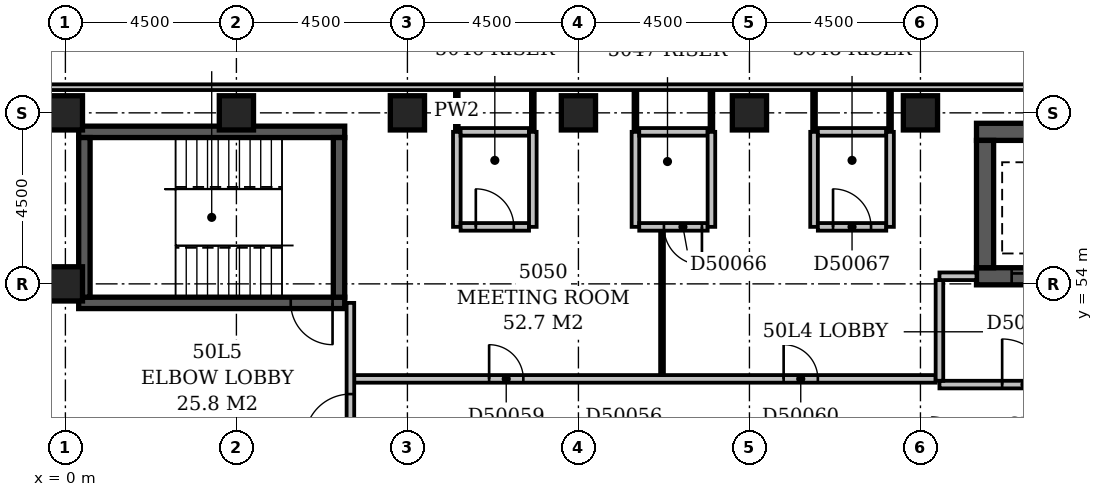
"""IFC4 building model, lengths in metres.
Left out: names, types, materials, properties, quantities, classifications, styles, units other than length and angle.
Written with IfcOpenShell. Run it as: python <this file> out.ifc"""

import sys

from ifc_helpers import new_model, si_unit, direction, frame, frame_2d, origin, origin_2d, place, context, subcontext, project, spatial, rectangle, extrude, element, fill, save


model = new_model("IFC4")
c1 = context("Model", 3, precision=1e-05, world=origin(), true_north=direction((0.0, 1.0)))
c2 = subcontext(c1, "Body", "Model", "MODEL_VIEW")
j1 = project(units=[si_unit("LENGTHUNIT", "METRE"), si_unit("PLANEANGLEUNIT", "RADIAN")], contexts=[c1])
p1 = place(None, origin())
s1 = spatial("IfcSite", under=j1, at=p1, CompositionType="ELEMENT")
p2 = place(p1, origin())
s2 = spatial("IfcBuilding", under=s1, at=p2, CompositionType="ELEMENT")
p3 = place(p2, frame((0.0, 0.0, 197.0)))
s3 = spatial("IfcBuildingStorey", under=s2, at=p3, CompositionType="ELEMENT", Elevation=197.0)
p4 = place(p3, frame((0.35, 53.5, -0.3), z_axis=(0.0, 0.0, 1.0), x_axis=(1.0, 0.0, 0.0)))
e1 = element("IfcWall", 1, at=p4, inside=s3, PredefinedType="SHEAR", context=c2, shape_type="SweptSolid", body=[
    extrude(rectangle(XDim=7.0, YDim=0.3, at=frame_2d((3.5, 0.0))), origin(), (0.0, 0.0, 1.0), 3.6),
])
p5 = place(p4, frame((5.58, 0.0, 0.3)))
e2 = element("IfcOpeningElement", 2, at=p5, cuts=e1, PredefinedType="OPENING", context=c2, shape_type="SweptSolid", body=[
    extrude(rectangle(XDim=1.1, YDim=2.1, at=frame_2d((0.55, 1.05))), frame((0.0, 0.162, 0.0), z_axis=(0.0, -1.0, 0.0), x_axis=(1.0, 0.0, 0.0)), (0.0, 0.0, 1.0), 0.324),
])
p6 = place(p3, frame((0.35, 58.0, -0.3), z_axis=(0.0, 0.0, 1.0), x_axis=(1.0, 0.0, 0.0)))
e3 = element("IfcWall", 3, at=p6, inside=s3, PredefinedType="SHEAR", context=c2, shape_type="SweptSolid", body=[
    extrude(rectangle(XDim=7.0, YDim=0.3, at=frame_2d((3.5, 0.0))), origin(), (0.0, 0.0, 1.0), 3.6),
])
for number, where, z_axis, x_axis in (
    (4, (0.5, 53.65, -0.3), (0.0, 0.0, 1.0), (0.0, 1.0, 0.0)),
    (5, (7.2, 53.65, -0.3), (0.0, 0.0, 1.0), (0.0, 1.0, 0.0)),
):
    element("IfcWall", number, at=place(p3, frame(where, z_axis=z_axis, x_axis=x_axis)), inside=s3, PredefinedType="SHEAR", context=c2, shape_type="SweptSolid", body=[
        extrude(rectangle(XDim=4.2, YDim=0.3, at=frame_2d((2.1, 0.0))), origin(), (0.0, 0.0, 1.0), 3.6),
    ])
p7 = place(p3, frame((23.975, 54.2, -0.3), z_axis=(0.0, 0.0, 1.0), x_axis=(1.0, 0.0, 0.0)))
e6 = element("IfcWall", 6, at=p7, inside=s3, PredefinedType="SHEAR", context=c2, shape_type="SweptSolid", body=[
    extrude(rectangle(XDim=2.95, YDim=0.45, at=frame_2d((1.475, 0.0))), origin(), (0.0, 0.0, 1.0), 3.6),
])
p8 = place(p7, frame((0.925, 0.0, 0.3)))
e7 = element("IfcOpeningElement", 7, at=p8, cuts=e6, PredefinedType="OPENING", context=c2, shape_type="SweptSolid", body=[
    extrude(rectangle(XDim=1.1, YDim=2.1, at=frame_2d((0.55, 1.05))), frame((0.0, 0.237, 0.0), z_axis=(0.0, -1.0, 0.0), x_axis=(1.0, 0.0, 0.0)), (0.0, 0.0, 1.0), 0.474),
])
p9 = place(p3, frame((23.975, 58.0, -0.3), z_axis=(0.0, 0.0, 1.0), x_axis=(1.0, 0.0, 0.0)))
e8 = element("IfcWall", 8, at=p9, inside=s3, PredefinedType="SHEAR", context=c2, shape_type="SweptSolid", body=[
    extrude(rectangle(XDim=2.95, YDim=0.45, at=frame_2d((1.475, 0.0))), origin(), (0.0, 0.0, 1.0), 3.6),
])
p10 = place(p3, frame((24.2, 54.425, -0.3), z_axis=(0.0, 0.0, 1.0), x_axis=(0.0, 1.0, 0.0)))
e9 = element("IfcWall", 9, at=p10, inside=s3, PredefinedType="SHEAR", context=c2, shape_type="SweptSolid", body=[
    extrude(rectangle(XDim=3.35, YDim=0.45, at=frame_2d((1.675, 0.0))), origin(), (0.0, 0.0, 1.0), 3.6),
])
for number, where, z_axis, x_axis in (
    (10, (0.0, 54.0, -0.3), (0.0, 0.0, 1.0), (1.0, 0.0, 0.0)),
    (11, (0.0, 58.5, -0.3), (0.0, 0.0, 1.0), (1.0, 0.0, 0.0)),
    (12, (4.5, 58.5, -0.3), (0.0, 0.0, 1.0), (1.0, 0.0, 0.0)),
    (13, (9.0, 58.5, -0.3), (0.0, 0.0, 1.0), (1.0, 0.0, 0.0)),
    (14, (13.5, 58.5, -0.3), (0.0, 0.0, 1.0), (1.0, 0.0, 0.0)),
    (15, (18.0, 58.5, -0.3), (0.0, 0.0, 1.0), (1.0, 0.0, 0.0)),
    (16, (22.5, 58.5, -0.3), (0.0, 0.0, 1.0), (1.0, 0.0, 0.0)),
):
    element("IfcColumn", number, at=place(p3, frame(where, z_axis=z_axis, x_axis=x_axis)), inside=s3, PredefinedType="COLUMN", context=c2, shape_type="SweptSolid", body=[
        extrude(rectangle(XDim=0.9, YDim=0.9, at=origin_2d()), origin(), (0.0, 0.0, 1.0), 3.6),
    ])
p11 = place(p3, frame((50.1, 59.175, 0.0), z_axis=(0.0, 0.0, 1.0), x_axis=(-1.0, 0.0, 0.0)))
e17 = element("IfcWall", 17, at=p11, inside=s3, PredefinedType="STANDARD", context=c2, shape_type="SweptSolid", body=[
    extrude(rectangle(XDim=50.85, YDim=0.15, at=frame_2d((25.425, 0.0))), origin(), (0.0, 0.0, 1.0), 2.7),
])
p12 = place(p3, frame((23.0, 51.35, 0.0), z_axis=(0.0, 0.0, 1.0), x_axis=(1.0, 0.0, 0.0)))
e18 = element("IfcWall", 18, at=p12, inside=s3, PredefinedType="PARTITIONING", context=c2, shape_type="SweptSolid", body=[
    extrude(rectangle(XDim=4.8, YDim=0.2, at=frame_2d((2.4, 0.0))), origin(), (0.0, 0.0, 1.0), 3.3),
])
p13 = place(p12, frame((1.65, 0.0, 0.0)))
e19 = element("IfcOpeningElement", 19, at=p13, cuts=e18, PredefinedType="OPENING", context=c2, shape_type="SweptSolid", body=[
    extrude(rectangle(XDim=1.2, YDim=2.1, at=frame_2d((0.6, 1.05))), frame((0.0, 0.112, 0.0), z_axis=(0.0, -1.0, 0.0), x_axis=(1.0, 0.0, 0.0)), (0.0, 0.0, 1.0), 0.224),
])
p14 = place(p3, frame((23.0, 54.2, 0.0), z_axis=(0.0, 0.0, 1.0), x_axis=(1.0, 0.0, 0.0)))
e20 = element("IfcWall", 20, at=p14, inside=s3, PredefinedType="PARTITIONING", context=c2, shape_type="SweptSolid", body=[
    extrude(rectangle(XDim=0.975, YDim=0.2, at=frame_2d((0.488, 0.0))), origin(), (0.0, 0.0, 1.0), 3.3),
])
p15 = place(p3, frame((23.0, 51.45, 0.0), z_axis=(0.0, 0.0, 1.0), x_axis=(0.0, 1.0, 0.0)))
e21 = element("IfcWall", 21, at=p15, inside=s3, PredefinedType="PARTITIONING", context=c2, shape_type="SweptSolid", body=[
    extrude(rectangle(XDim=2.65, YDim=0.2, at=frame_2d((1.325, 0.0))), origin(), (0.0, 0.0, 1.0), 3.3),
])
p16 = place(p3, frame((7.5, 49.6, 0.0), z_axis=(0.0, 0.0, 1.0), x_axis=(0.0, 1.0, 0.0)))
e22 = element("IfcWall", 22, at=p16, inside=s3, PredefinedType="PARTITIONING", context=c2, shape_type="SweptSolid", body=[
    extrude(rectangle(XDim=3.9, YDim=0.2, at=frame_2d((1.95, 0.0))), origin(), (0.0, 0.0, 1.0), 3.3),
])
p17 = place(p16, frame((0.3, 0.0, 0.0)))
e23 = element("IfcOpeningElement", 23, at=p17, cuts=e22, PredefinedType="OPENING", context=c2, shape_type="SweptSolid", body=[
    extrude(rectangle(XDim=1.2, YDim=2.1, at=frame_2d((0.6, 1.05))), frame((0.0, 0.112, 0.0), z_axis=(0.0, -1.0, 0.0), x_axis=(1.0, 0.0, 0.0)), (0.0, 0.0, 1.0), 0.224),
])
p18 = place(p3, frame((7.6, 51.5, 0.0), z_axis=(0.0, 0.0, 1.0), x_axis=(1.0, 0.0, 0.0)))
e24 = element("IfcWall", 24, at=p18, inside=s3, PredefinedType="PARTITIONING", context=c2, shape_type="SweptSolid", body=[
    extrude(rectangle(XDim=15.3, YDim=0.2, at=frame_2d((7.65, 0.0))), origin(), (0.0, 0.0, 1.0), 3.3),
])
p19 = place(p18, frame((3.55, 0.0, 0.0)))
e25 = element("IfcOpeningElement", 25, at=p19, cuts=e24, PredefinedType="OPENING", context=c2, shape_type="SweptSolid", body=[
    extrude(rectangle(XDim=0.9, YDim=2.1, at=frame_2d((0.45, 1.05))), frame((0.0, 0.112, 0.0), z_axis=(0.0, -1.0, 0.0), x_axis=(1.0, 0.0, 0.0)), (0.0, 0.0, 1.0), 0.224),
])
p20 = place(p18, frame((11.3, 0.0, 0.0)))
e26 = element("IfcOpeningElement", 26, at=p20, cuts=e24, PredefinedType="OPENING", context=c2, shape_type="SweptSolid", body=[
    extrude(rectangle(XDim=0.9, YDim=2.1, at=frame_2d((0.45, 1.05))), frame((0.0, 0.112, 0.0), z_axis=(0.0, -1.0, 0.0), x_axis=(1.0, 0.0, 0.0)), (0.0, 0.0, 1.0), 0.224),
])
p21 = place(p3, frame((15.7, 51.6, 0.0), z_axis=(0.0, 0.0, 1.0), x_axis=(0.0, 1.0, 0.0)))
e27 = element("IfcWall", 27, at=p21, inside=s3, PredefinedType="PARTITIONING", context=c2, shape_type="SweptSolid", body=[
    extrude(rectangle(XDim=3.8, YDim=0.1, at=frame_2d((1.9, 0.0))), origin(), (0.0, 0.0, 1.0), 3.3),
])
p22 = place(p3, frame((10.3, 55.5, 0.0), z_axis=(0.0, 0.0, 1.0), x_axis=(0.0, 1.0, 0.0)))
e28 = element("IfcWall", 28, at=p22, inside=s3, PredefinedType="PARTITIONING", context=c2, shape_type="SweptSolid", body=[
    extrude(rectangle(XDim=2.5, YDim=0.2, at=frame_2d((1.25, 0.0))), origin(), (0.0, 0.0, 1.0), 3.3),
])
p23 = place(p3, frame((10.4, 55.5, 0.0), z_axis=(0.0, 0.0, 1.0), x_axis=(1.0, 0.0, 0.0)))
e29 = element("IfcWall", 29, at=p23, inside=s3, PredefinedType="PARTITIONING", context=c2, shape_type="SweptSolid", body=[
    extrude(rectangle(XDim=1.8, YDim=0.2, at=frame_2d((0.9, 0.0))), origin(), (0.0, 0.0, 1.0), 3.3),
])
p24 = place(p23, frame((0.4, 0.0, 0.0)))
e30 = element("IfcOpeningElement", 30, at=p24, cuts=e29, PredefinedType="OPENING", context=c2, shape_type="SweptSolid", body=[
    extrude(rectangle(XDim=1.0, YDim=2.1, at=frame_2d((0.5, 1.05))), frame((0.0, 0.112, 0.0), z_axis=(0.0, -1.0, 0.0), x_axis=(1.0, 0.0, 0.0)), (0.0, 0.0, 1.0), 0.224),
])
for number, where, z_axis, x_axis in (
    (31, (12.3, 55.5, 0.0), (0.0, 0.0, 1.0), (0.0, 1.0, 0.0)),
    (32, (15.0, 55.5, 0.0), (0.0, 0.0, 1.0), (0.0, 1.0, 0.0)),
):
    element("IfcWall", number, at=place(p3, frame(where, z_axis=z_axis, x_axis=x_axis)), inside=s3, PredefinedType="PARTITIONING", context=c2, shape_type="SweptSolid", body=[
        extrude(rectangle(XDim=2.5, YDim=0.2, at=frame_2d((1.25, 0.0))), origin(), (0.0, 0.0, 1.0), 3.3),
    ])
p25 = place(p3, frame((15.1, 55.5, 0.0), z_axis=(0.0, 0.0, 1.0), x_axis=(1.0, 0.0, 0.0)))
e33 = element("IfcWall", 33, at=p25, inside=s3, PredefinedType="PARTITIONING", context=c2, shape_type="SweptSolid", body=[
    extrude(rectangle(XDim=1.8, YDim=0.2, at=frame_2d((0.9, 0.0))), origin(), (0.0, 0.0, 1.0), 3.3),
])
p26 = place(p25, frame((0.65, 0.0, 0.0)))
e34 = element("IfcOpeningElement", 34, at=p26, cuts=e33, PredefinedType="OPENING", context=c2, shape_type="SweptSolid", body=[
    extrude(rectangle(XDim=1.0, YDim=2.1, at=frame_2d((0.5, 1.05))), frame((0.0, 0.112, 0.0), z_axis=(0.0, -1.0, 0.0), x_axis=(1.0, 0.0, 0.0)), (0.0, 0.0, 1.0), 0.224),
])
for number, where, z_axis, x_axis in (
    (35, (17.0, 55.5, 0.0), (0.0, 0.0, 1.0), (0.0, 1.0, 0.0)),
    (36, (19.7, 55.5, 0.0), (0.0, 0.0, 1.0), (0.0, 1.0, 0.0)),
):
    element("IfcWall", number, at=place(p3, frame(where, z_axis=z_axis, x_axis=x_axis)), inside=s3, PredefinedType="PARTITIONING", context=c2, shape_type="SweptSolid", body=[
        extrude(rectangle(XDim=2.5, YDim=0.2, at=frame_2d((1.25, 0.0))), origin(), (0.0, 0.0, 1.0), 3.3),
    ])
p27 = place(p3, frame((19.8, 55.5, 0.0), z_axis=(0.0, 0.0, 1.0), x_axis=(1.0, 0.0, 0.0)))
e37 = element("IfcWall", 37, at=p27, inside=s3, PredefinedType="PARTITIONING", context=c2, shape_type="SweptSolid", body=[
    extrude(rectangle(XDim=1.8, YDim=0.2, at=frame_2d((0.9, 0.0))), origin(), (0.0, 0.0, 1.0), 3.3),
])
p28 = place(p27, frame((0.4, 0.0, 0.0)))
e38 = element("IfcOpeningElement", 38, at=p28, cuts=e37, PredefinedType="OPENING", context=c2, shape_type="SweptSolid", body=[
    extrude(rectangle(XDim=1.0, YDim=2.1, at=frame_2d((0.5, 1.05))), frame((0.0, 0.112, 0.0), z_axis=(0.0, -1.0, 0.0), x_axis=(1.0, 0.0, 0.0)), (0.0, 0.0, 1.0), 0.224),
])
p29 = place(p3, frame((21.7, 55.5, 0.0), z_axis=(0.0, 0.0, 1.0), x_axis=(0.0, 1.0, 0.0)))
e39 = element("IfcWall", 39, at=p29, inside=s3, PredefinedType="PARTITIONING", context=c2, shape_type="SweptSolid", body=[
    extrude(rectangle(XDim=2.5, YDim=0.2, at=frame_2d((1.25, 0.0))), origin(), (0.0, 0.0, 1.0), 3.3),
])
p30 = place(p3, frame((10.3, 58.0, 0.0), z_axis=(0.0, 0.0, 1.0), x_axis=(0.0, 1.0, 0.0)))
e40 = element("IfcWall", 40, at=p30, inside=s3, PredefinedType="PARTITIONING", context=c2, shape_type="SweptSolid", body=[
    extrude(rectangle(XDim=1.1, YDim=0.1, at=frame_2d((0.55, 0.0))), origin(), (0.0, 0.0, 1.0), 3.3),
])
p31 = place(p3, frame((10.4, 58.0, 0.0), z_axis=(0.0, 0.0, 1.0), x_axis=(1.0, 0.0, 0.0)))
e41 = element("IfcWall", 41, at=p31, inside=s3, PredefinedType="PARTITIONING", context=c2, shape_type="SweptSolid", body=[
    extrude(rectangle(XDim=1.8, YDim=0.2, at=frame_2d((0.9, 0.0))), origin(), (0.0, 0.0, 1.0), 3.3),
])
for number, where, z_axis, x_axis in (
    (42, (12.3, 58.0, 0.0), (0.0, 0.0, 1.0), (0.0, 1.0, 0.0)),
    (43, (15.0, 58.0, 0.0), (0.0, 0.0, 1.0), (0.0, 1.0, 0.0)),
):
    element("IfcWall", number, at=place(p3, frame(where, z_axis=z_axis, x_axis=x_axis)), inside=s3, PredefinedType="PARTITIONING", context=c2, shape_type="SweptSolid", body=[
        extrude(rectangle(XDim=1.1, YDim=0.1, at=frame_2d((0.55, 0.0))), origin(), (0.0, 0.0, 1.0), 3.3),
    ])
p32 = place(p3, frame((15.1, 58.0, 0.0), z_axis=(0.0, 0.0, 1.0), x_axis=(1.0, 0.0, 0.0)))
e44 = element("IfcWall", 44, at=p32, inside=s3, PredefinedType="PARTITIONING", context=c2, shape_type="SweptSolid", body=[
    extrude(rectangle(XDim=1.8, YDim=0.2, at=frame_2d((0.9, 0.0))), origin(), (0.0, 0.0, 1.0), 3.3),
])
for number, where, z_axis, x_axis in (
    (45, (17.0, 58.0, 0.0), (0.0, 0.0, 1.0), (0.0, 1.0, 0.0)),
    (46, (19.7, 58.0, 0.0), (0.0, 0.0, 1.0), (0.0, 1.0, 0.0)),
):
    element("IfcWall", number, at=place(p3, frame(where, z_axis=z_axis, x_axis=x_axis)), inside=s3, PredefinedType="PARTITIONING", context=c2, shape_type="SweptSolid", body=[
        extrude(rectangle(XDim=1.1, YDim=0.1, at=frame_2d((0.55, 0.0))), origin(), (0.0, 0.0, 1.0), 3.3),
    ])
p33 = place(p3, frame((19.8, 58.0, 0.0), z_axis=(0.0, 0.0, 1.0), x_axis=(1.0, 0.0, 0.0)))
e47 = element("IfcWall", 47, at=p33, inside=s3, PredefinedType="PARTITIONING", context=c2, shape_type="SweptSolid", body=[
    extrude(rectangle(XDim=1.8, YDim=0.2, at=frame_2d((0.9, 0.0))), origin(), (0.0, 0.0, 1.0), 3.3),
])
p34 = place(p3, frame((21.7, 58.0, 0.0), z_axis=(0.0, 0.0, 1.0), x_axis=(0.0, 1.0, 0.0)))
e48 = element("IfcWall", 48, at=p34, inside=s3, PredefinedType="PARTITIONING", context=c2, shape_type="SweptSolid", body=[
    extrude(rectangle(XDim=1.1, YDim=0.1, at=frame_2d((0.55, 0.0))), origin(), (0.0, 0.0, 1.0), 3.3),
])
p35 = place(p17, origin())
e49 = element("IfcDoor", 49, at=p35, inside=s3, OperationType="SINGLE_SWING_LEFT", PredefinedType="DOOR", context=c2, shape_type="SweptSolid", body=[
    extrude(rectangle(XDim=1.2, YDim=2.1, at=frame_2d((0.6, 1.05))), frame((0.0, 0.025, 0.0), z_axis=(0.0, -1.0, 0.0), x_axis=(1.0, 0.0, 0.0)), (0.0, 0.0, 1.0), 0.05),
])
fill(e23, e49)
p36 = place(p13, origin())
e50 = element("IfcDoor", 50, at=p36, inside=s3, OperationType="SINGLE_SWING_LEFT", PredefinedType="DOOR", context=c2, shape_type="SweptSolid", body=[
    extrude(rectangle(XDim=1.2, YDim=2.1, at=frame_2d((0.6, 1.05))), frame((0.0, 0.025, 0.0), z_axis=(0.0, -1.0, 0.0), x_axis=(1.0, 0.0, 0.0)), (0.0, 0.0, 1.0), 0.05),
])
fill(e19, e50)
p37 = place(p8, origin())
e51 = element("IfcDoor", 51, at=p37, inside=s3, OperationType="SLIDING_TO_LEFT", PredefinedType="DOOR", context=c2, shape_type="SweptSolid", body=[
    extrude(rectangle(XDim=1.1, YDim=2.1, at=frame_2d((0.55, 1.05))), frame((0.0, 0.025, 0.0), z_axis=(0.0, -1.0, 0.0), x_axis=(1.0, 0.0, 0.0)), (0.0, 0.0, 1.0), 0.05),
])
fill(e7, e51)
p38 = place(p5, origin())
e52 = element("IfcDoor", 52, at=p38, inside=s3, OperationType="SINGLE_SWING_RIGHT", PredefinedType="DOOR", context=c2, shape_type="SweptSolid", body=[
    extrude(rectangle(XDim=1.1, YDim=2.1, at=frame_2d((0.55, 1.05))), frame((0.0, 0.025, 0.0), z_axis=(0.0, -1.0, 0.0), x_axis=(1.0, 0.0, 0.0)), (0.0, 0.0, 1.0), 0.05),
])
fill(e2, e52)
p39 = place(p19, origin())
e53 = element("IfcDoor", 53, at=p39, inside=s3, OperationType="SINGLE_SWING_LEFT", PredefinedType="DOOR", context=c2, shape_type="SweptSolid", body=[
    extrude(rectangle(XDim=0.9, YDim=2.1, at=frame_2d((0.45, 1.05))), frame((0.0, 0.025, 0.0), z_axis=(0.0, -1.0, 0.0), x_axis=(1.0, 0.0, 0.0)), (0.0, 0.0, 1.0), 0.05),
])
fill(e25, e53)
p40 = place(p20, origin())
e54 = element("IfcDoor", 54, at=p40, inside=s3, OperationType="SINGLE_SWING_LEFT", PredefinedType="DOOR", context=c2, shape_type="SweptSolid", body=[
    extrude(rectangle(XDim=0.9, YDim=2.1, at=frame_2d((0.45, 1.05))), frame((0.0, 0.025, 0.0), z_axis=(0.0, -1.0, 0.0), x_axis=(1.0, 0.0, 0.0)), (0.0, 0.0, 1.0), 0.05),
])
fill(e26, e54)
p41 = place(p24, origin())
e55 = element("IfcDoor", 55, at=p41, inside=s3, OperationType="SINGLE_SWING_LEFT", PredefinedType="DOOR", context=c2, shape_type="SweptSolid", body=[
    extrude(rectangle(XDim=1.0, YDim=2.1, at=frame_2d((0.5, 1.05))), frame((0.0, 0.025, 0.0), z_axis=(0.0, -1.0, 0.0), x_axis=(1.0, 0.0, 0.0)), (0.0, 0.0, 1.0), 0.05),
])
fill(e30, e55)
p42 = place(p26, origin())
e56 = element("IfcDoor", 56, at=p42, inside=s3, OperationType="SINGLE_SWING_RIGHT", PredefinedType="DOOR", context=c2, shape_type="SweptSolid", body=[
    extrude(rectangle(XDim=1.0, YDim=2.1, at=frame_2d((0.5, 1.05))), frame((0.0, 0.025, 0.0), z_axis=(0.0, -1.0, 0.0), x_axis=(1.0, 0.0, 0.0)), (0.0, 0.0, 1.0), 0.05),
])
fill(e34, e56)
p43 = place(p28, origin())
e57 = element("IfcDoor", 57, at=p43, inside=s3, OperationType="SINGLE_SWING_LEFT", PredefinedType="DOOR", context=c2, shape_type="SweptSolid", body=[
    extrude(rectangle(XDim=1.0, YDim=2.1, at=frame_2d((0.5, 1.05))), frame((0.0, 0.025, 0.0), z_axis=(0.0, -1.0, 0.0), x_axis=(1.0, 0.0, 0.0)), (0.0, 0.0, 1.0), 0.05),
])
fill(e38, e57)
save(model, sys.argv[1])
